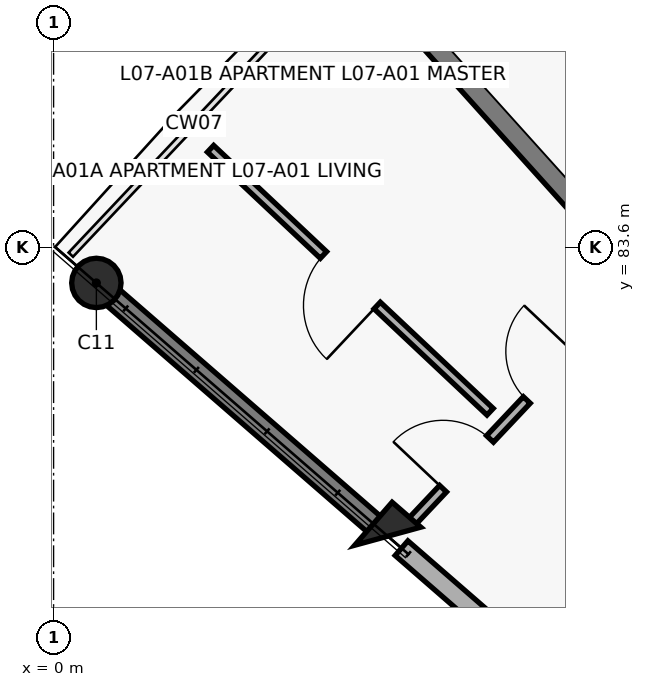
"""IFC4 building model, lengths in metres.
Left out: names, types, materials, properties, quantities, classifications, styles, units other than length and angle.
Written with IfcOpenShell. Run it as: python <this file> out.ifc"""

import sys

from ifc_helpers import new_model, si_unit, direction, frame, frame_2d, origin, origin_2d, place, context, subcontext, project, spatial, rectangle, circle, extrude, element, fill, save


model = new_model("IFC4")
c1 = context("Model", 3, precision=1e-05, world=origin(), true_north=direction((0.0, 1.0)))
c2 = subcontext(c1, "Body", "Model", "MODEL_VIEW")
j1 = project(units=[si_unit("LENGTHUNIT", "METRE"), si_unit("PLANEANGLEUNIT", "RADIAN")], contexts=[c1])
p1 = place(None, origin())
s1 = spatial("IfcSite", under=j1, at=p1, CompositionType="ELEMENT")
p2 = place(p1, origin())
s2 = spatial("IfcBuilding", under=s1, at=p2, CompositionType="ELEMENT")
p3 = place(p2, frame((0.0, 0.0, 23.6)))
s3 = spatial("IfcBuildingStorey", under=s2, at=p3, CompositionType="ELEMENT", Elevation=23.6)
p4 = place(p3, frame((4.397, 79.796, 0.0), z_axis=(0.0, 0.0, 1.0), x_axis=(-0.754709580223, 0.656059028991, 0.0)))
e1 = element("IfcColumn", 1, at=p4, inside=s3, PredefinedType="COLUMN", context=c2, shape_type="SweptSolid", body=[
    extrude(rectangle(XDim=0.5, YDim=0.75, at=origin_2d()), origin(), (0.0, 0.0, 1.0), 3.1),
])
p5 = place(p3, frame((0.563, 83.129, 0.0), z_axis=(0.0, 0.0, 1.0), x_axis=(-0.754709580223, 0.656059028991, 0.0)))
e2 = element("IfcColumn", 2, at=p5, inside=s3, PredefinedType="COLUMN", context=c2, shape_type="SweptSolid", body=[
    extrude(circle(Radius=0.325, at=origin_2d()), origin(), (0.0, 0.0, 1.0), 3.1),
])
p6 = place(p3, frame((4.261, 79.914, 0.0), z_axis=(0.0, 0.0, 1.0), x_axis=(-0.754703505217, 0.65606601742, 0.0)))
e3 = element("IfcWall", 3, at=p6, inside=s3, PredefinedType="SHEAR", context=c2, shape_type="SweptSolid", body=[
    extrude(rectangle(XDim=4.72, YDim=0.27, at=frame_2d((2.36, 0.0))), origin(), (0.0, 0.0, 1.0), 2.86),
])
p7 = place(p3, frame((10.766, 74.259, 0.0), z_axis=(0.0, 0.0, 1.0), x_axis=(-0.754717680958, 0.656049710044, 0.0)))
e4 = element("IfcWall", 4, at=p7, inside=s3, PredefinedType="SOLIDWALL", context=c2, shape_type="SweptSolid", body=[
    extrude(rectangle(XDim=8.2, YDim=0.255, at=frame_2d((4.1, 0.0))), origin(), (0.0, 0.0, 1.0), 2.18),
])
p8 = place(p7, frame((3.59, 0.0, 0.75)))
e5 = element("IfcOpeningElement", 5, at=p8, cuts=e4, PredefinedType="OPENING", context=c2, shape_type="SweptSolid", body=[
    extrude(rectangle(XDim=1.35, YDim=1.35, at=frame_2d((0.675, 0.675))), frame((0.0, 0.137, 0.0), z_axis=(0.0, -1.0, 0.0), x_axis=(1.0, 0.0, 0.0)), (0.0, 0.0, 1.0), 0.275),
])
p9 = place(p3, frame((9.691, 81.073, 0.0), z_axis=(0.0, 0.0, 1.0), x_axis=(-0.668885797871, 0.743365179038, 0.0)))
e6 = element("IfcWall", 6, at=p9, inside=s3, PredefinedType="SHEAR", context=c2, shape_type="SweptSolid", body=[
    extrude(rectangle(XDim=7.69, YDim=0.3, at=frame_2d((3.845, 0.0))), origin(), (0.0, 0.0, 1.0), 3.1),
])
p10 = place(p3, frame((4.678, 79.948, 0.0), z_axis=(0.0, 0.0, 1.0), x_axis=(0.686331812627, 0.72728855551, 0.0)))
e7 = element("IfcWall", 7, at=p10, inside=s3, PredefinedType="PARTITIONING", context=c2, shape_type="SweptSolid", body=[
    extrude(rectangle(XDim=3.785, YDim=0.125, at=frame_2d((1.893, 0.0))), origin(), (0.0, 0.0, 1.0), 2.08),
])
p11 = place(p10, frame((0.65, 0.0, 0.0)))
e8 = element("IfcOpeningElement", 8, at=p11, cuts=e7, PredefinedType="OPENING", context=c2, shape_type="SweptSolid", body=[
    extrude(rectangle(XDim=0.9, YDim=2.1, at=frame_2d((0.45, 1.05))), frame((0.0, 0.073, 0.0), z_axis=(0.0, -1.0, 0.0), x_axis=(1.0, 0.0, 0.0)), (0.0, 0.0, 1.0), 0.145),
])
p12 = place(p10, frame((2.255, 0.0, 0.0)))
e9 = element("IfcOpeningElement", 9, at=p12, cuts=e7, PredefinedType="OPENING", context=c2, shape_type="SweptSolid", body=[
    extrude(rectangle(XDim=0.88, YDim=2.1, at=frame_2d((0.44, 1.05))), frame((0.0, 0.073, 0.0), z_axis=(0.0, -1.0, 0.0), x_axis=(1.0, 0.0, 0.0)), (0.0, 0.0, 1.0), 0.145),
])
p13 = place(p3, frame((5.743, 81.434, 0.0), z_axis=(0.0, 0.0, 1.0), x_axis=(-0.72831636485, 0.685241032551, 0.0)))
e10 = element("IfcWall", 10, at=p13, inside=s3, PredefinedType="PARTITIONING", context=c2, shape_type="SweptSolid", body=[
    extrude(rectangle(XDim=5.05, YDim=0.12, at=frame_2d((2.525, 0.0))), origin(), (0.0, 0.0, 1.0), 2.08),
])
p14 = place(p13, frame((2.04, 0.0, 0.0)))
e11 = element("IfcOpeningElement", 11, at=p14, cuts=e10, PredefinedType="OPENING", context=c2, shape_type="SweptSolid", body=[
    extrude(rectangle(XDim=0.97, YDim=2.1, at=frame_2d((0.485, 1.05))), frame((0.0, 0.07, 0.0), z_axis=(0.0, -1.0, 0.0), x_axis=(1.0, 0.0, 0.0)), (0.0, 0.0, 1.0), 0.14),
])
p15 = place(p11, origin())
e12 = element("IfcDoor", 12, at=p15, inside=s3, OperationType="SINGLE_SWING_LEFT", PredefinedType="DOOR", context=c2, shape_type="SweptSolid", body=[
    extrude(rectangle(XDim=0.9, YDim=2.1, at=frame_2d((0.45, 1.05))), frame((0.0, 0.025, 0.0), z_axis=(0.0, -1.0, 0.0), x_axis=(1.0, 0.0, 0.0)), (0.0, 0.0, 1.0), 0.05),
])
fill(e8, e12)
p16 = place(p12, origin())
e13 = element("IfcDoor", 13, at=p16, inside=s3, OperationType="SINGLE_SWING_RIGHT", PredefinedType="DOOR", context=c2, shape_type="SweptSolid", body=[
    extrude(rectangle(XDim=0.88, YDim=2.1, at=frame_2d((0.44, 1.05))), frame((0.0, 0.025, 0.0), z_axis=(0.0, -1.0, 0.0), x_axis=(1.0, 0.0, 0.0)), (0.0, 0.0, 1.0), 0.05),
])
fill(e9, e13)
p17 = place(p14, origin())
e14 = element("IfcDoor", 14, at=p17, inside=s3, OperationType="SINGLE_SWING_LEFT", PredefinedType="DOOR", context=c2, shape_type="SweptSolid", body=[
    extrude(rectangle(XDim=0.97, YDim=2.1, at=frame_2d((0.485, 1.05))), frame((0.0, 0.025, 0.0), z_axis=(0.0, -1.0, 0.0), x_axis=(1.0, 0.0, 0.0)), (0.0, 0.0, 1.0), 0.05),
])
fill(e11, e14)
save(model, sys.argv[1])
